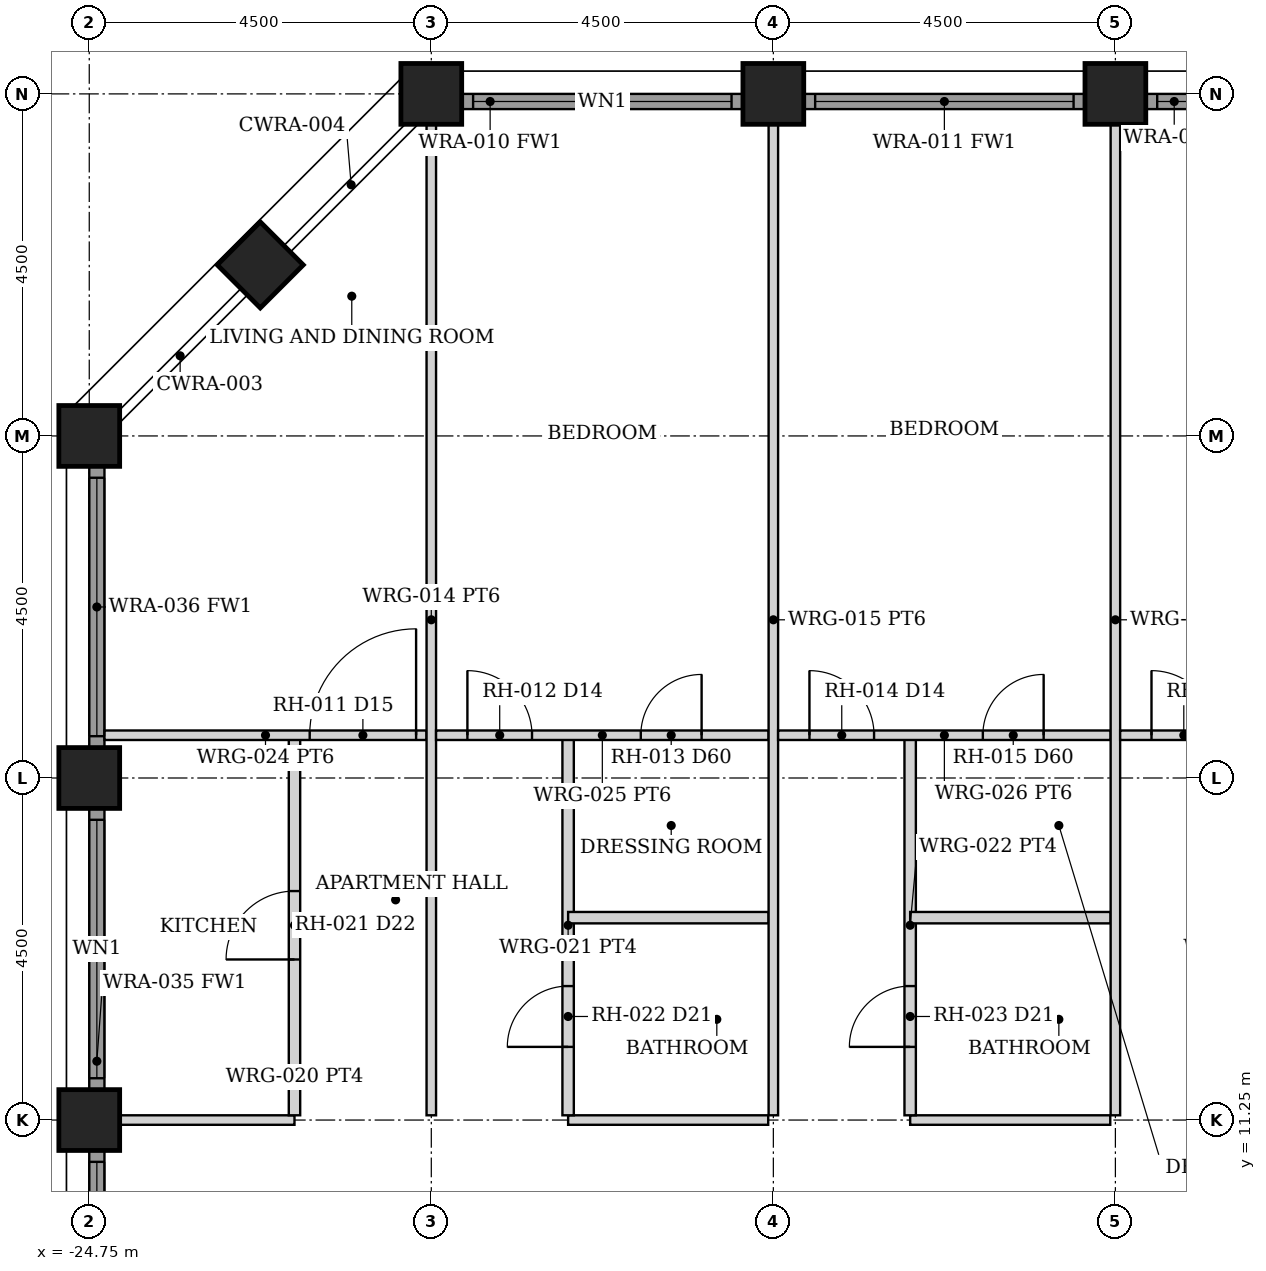
"""IFC4 building model, lengths in metres.
Left out: names, types, materials, properties, quantities, classifications, styles, units other than length and angle.
Written with IfcOpenShell. Run it as: python <this file> out.ifc"""

import sys

from ifc_helpers import new_model, si_unit, direction, frame, frame_2d, origin, origin_2d, place, context, subcontext, project, spatial, rectangle, hollow_rectangle, extrude, element, fill, save


model = new_model("IFC4")
c1 = context("Model", 3, precision=1e-05, world=origin(), true_north=direction((0.0, 1.0)))
c2 = subcontext(c1, "Body", "Model", "MODEL_VIEW")
j1 = project(units=[si_unit("LENGTHUNIT", "METRE"), si_unit("PLANEANGLEUNIT", "RADIAN")], contexts=[c1])
p1 = place(None, origin())
s1 = spatial("IfcSite", under=j1, at=p1, CompositionType="ELEMENT")
p2 = place(p1, origin())
s2 = spatial("IfcBuilding", under=s1, at=p2, CompositionType="ELEMENT")
p3 = place(p2, frame((0.0, 0.0, 100.0)))
s3 = spatial("IfcBuildingStorey", under=s2, at=p3, CompositionType="ELEMENT", Elevation=100.0)
for number, where, z_axis, x_axis in (
    (1, (-20.25, 24.75, 0.0), (0.0, 0.0, 1.0), (0.0, 1.0, 0.0)),
    (2, (-15.75, 24.75, 0.0), (0.0, 0.0, 1.0), (0.0, 1.0, 0.0)),
    (3, (-11.25, 24.75, 0.0), (0.0, 0.0, 1.0), (0.0, 1.0, 0.0)),
    (4, (-24.75, 11.25, 0.0), (0.0, 0.0, 1.0), (1.0, 0.0, 0.0)),
    (5, (-24.75, 15.75, 0.0), (0.0, 0.0, 1.0), (1.0, 0.0, 0.0)),
    (6, (-24.75, 20.25, 0.0), (0.0, 0.0, 1.0), (1.0, 0.0, 0.0)),
    (7, (-22.5, 22.5, 0.0), (0.0, 0.0, 1.0), (0.707, -0.707, 0.0)),
):
    element("IfcColumn", number, at=place(p3, frame(where, z_axis=z_axis, x_axis=x_axis)), inside=s3, PredefinedType="COLUMN", context=c2, shape_type="SweptSolid", body=[
        extrude(hollow_rectangle(XDim=0.8, YDim=0.8, WallThickness=0.06, at=origin_2d()), origin(), (0.0, 0.0, 1.0), 3.5),
    ])
p4 = place(p3, frame((-19.845, 24.65, 0.0), z_axis=(0.0, 0.0, 1.0), x_axis=(1.0, 0.0, 0.0)))
e8 = element("IfcWall", 8, at=p4, inside=s3, PredefinedType="SOLIDWALL", context=c2, shape_type="SweptSolid", body=[
    extrude(rectangle(XDim=3.69, YDim=0.2, at=frame_2d((1.845, 0.0))), origin(), (0.0, 0.0, 1.0), 2.379),
])
p5 = place(p4, frame((0.145, 0.0, 0.3)))
e9 = element("IfcOpeningElement", 9, at=p5, cuts=e8, PredefinedType="OPENING", context=c2, shape_type="SweptSolid", body=[
    extrude(rectangle(XDim=3.4, YDim=1.929, at=frame_2d((1.7, 0.964))), frame((0.0, 0.11, 0.0), z_axis=(0.0, -1.0, 0.0), x_axis=(1.0, 0.0, 0.0)), (0.0, 0.0, 1.0), 0.22),
])
p6 = place(p3, frame((-15.345, 24.65, 0.0), z_axis=(0.0, 0.0, 1.0), x_axis=(1.0, 0.0, 0.0)))
e10 = element("IfcWall", 10, at=p6, inside=s3, PredefinedType="SOLIDWALL", context=c2, shape_type="SweptSolid", body=[
    extrude(rectangle(XDim=3.69, YDim=0.2, at=frame_2d((1.845, 0.0))), origin(), (0.0, 0.0, 1.0), 2.379),
])
p7 = place(p6, frame((0.145, 0.0, 0.3)))
e11 = element("IfcOpeningElement", 11, at=p7, cuts=e10, PredefinedType="OPENING", context=c2, shape_type="SweptSolid", body=[
    extrude(rectangle(XDim=3.4, YDim=1.929, at=frame_2d((1.7, 0.964))), frame((0.0, 0.11, 0.0), z_axis=(0.0, -1.0, 0.0), x_axis=(1.0, 0.0, 0.0)), (0.0, 0.0, 1.0), 0.22),
])
p8 = place(p3, frame((-10.845, 24.65, 0.0), z_axis=(0.0, 0.0, 1.0), x_axis=(1.0, 0.0, 0.0)))
e12 = element("IfcWall", 12, at=p8, inside=s3, PredefinedType="SOLIDWALL", context=c2, shape_type="SweptSolid", body=[
    extrude(rectangle(XDim=3.69, YDim=0.2, at=frame_2d((1.845, 0.0))), origin(), (0.0, 0.0, 1.0), 2.379),
])
p9 = place(p8, frame((0.145, 0.0, 0.3)))
e13 = element("IfcOpeningElement", 13, at=p9, cuts=e12, PredefinedType="OPENING", context=c2, shape_type="SweptSolid", body=[
    extrude(rectangle(XDim=3.4, YDim=1.929, at=frame_2d((1.7, 0.964))), frame((0.0, 0.11, 0.0), z_axis=(0.0, -1.0, 0.0), x_axis=(1.0, 0.0, 0.0)), (0.0, 0.0, 1.0), 0.22),
])
p10 = place(p3, frame((-24.65, 7.155, 0.0), z_axis=(0.0, 0.0, 1.0), x_axis=(0.0, 1.0, 0.0)))
e14 = element("IfcWall", 14, at=p10, inside=s3, PredefinedType="SOLIDWALL", context=c2, shape_type="SweptSolid", body=[
    extrude(rectangle(XDim=3.69, YDim=0.2, at=frame_2d((1.845, 0.0))), origin(), (0.0, 0.0, 1.0), 2.379),
])
p11 = place(p10, frame((0.145, 0.0, 0.3)))
e15 = element("IfcOpeningElement", 15, at=p11, cuts=e14, PredefinedType="OPENING", context=c2, shape_type="SweptSolid", body=[
    extrude(rectangle(XDim=3.4, YDim=1.929, at=frame_2d((1.7, 0.964))), frame((0.0, 0.11, 0.0), z_axis=(0.0, -1.0, 0.0), x_axis=(1.0, 0.0, 0.0)), (0.0, 0.0, 1.0), 0.22),
])
p12 = place(p3, frame((-24.65, 11.655, 0.0), z_axis=(0.0, 0.0, 1.0), x_axis=(0.0, 1.0, 0.0)))
e16 = element("IfcWall", 16, at=p12, inside=s3, PredefinedType="SOLIDWALL", context=c2, shape_type="SweptSolid", body=[
    extrude(rectangle(XDim=3.69, YDim=0.2, at=frame_2d((1.845, 0.0))), origin(), (0.0, 0.0, 1.0), 2.379),
])
p13 = place(p12, frame((0.145, 0.0, 0.3)))
e17 = element("IfcOpeningElement", 17, at=p13, cuts=e16, PredefinedType="OPENING", context=c2, shape_type="SweptSolid", body=[
    extrude(rectangle(XDim=3.4, YDim=1.929, at=frame_2d((1.7, 0.964))), frame((0.0, 0.11, 0.0), z_axis=(0.0, -1.0, 0.0), x_axis=(1.0, 0.0, 0.0)), (0.0, 0.0, 1.0), 0.22),
])
p14 = place(p3, frame((-24.65, 16.155, 0.0), z_axis=(0.0, 0.0, 1.0), x_axis=(0.0, 1.0, 0.0)))
e18 = element("IfcWall", 18, at=p14, inside=s3, PredefinedType="SOLIDWALL", context=c2, shape_type="SweptSolid", body=[
    extrude(rectangle(XDim=3.69, YDim=0.2, at=frame_2d((1.845, 0.0))), origin(), (0.0, 0.0, 1.0), 2.379),
])
p15 = place(p14, frame((0.145, 0.0, 0.3)))
e19 = element("IfcOpeningElement", 19, at=p15, cuts=e18, PredefinedType="OPENING", context=c2, shape_type="SweptSolid", body=[
    extrude(rectangle(XDim=3.4, YDim=1.929, at=frame_2d((1.7, 0.964))), frame((0.0, 0.11, 0.0), z_axis=(0.0, -1.0, 0.0), x_axis=(1.0, 0.0, 0.0)), (0.0, 0.0, 1.0), 0.22),
])
p16 = place(p3, frame((-24.35, 11.25, 0.0), z_axis=(0.0, 0.0, 1.0), x_axis=(1.0, 0.0, 0.0)))
e20 = element("IfcWall", 20, at=p16, inside=s3, PredefinedType="PARTITIONING", context=c2, shape_type="SweptSolid", body=[
    extrude(rectangle(XDim=2.3, YDim=0.125, at=frame_2d((1.15, 0.0))), origin(), (0.0, 0.0, 1.0), 2.373),
])
p17 = place(p3, frame((-22.05, 11.312, 0.0), z_axis=(0.0, 0.0, 1.0), x_axis=(0.0, 1.0, 0.0)))
e21 = element("IfcWall", 21, at=p17, inside=s3, PredefinedType="PARTITIONING", context=c2, shape_type="SweptSolid", body=[
    extrude(rectangle(XDim=5.0, YDim=0.15, at=frame_2d((2.5, 0.0))), origin(), (0.0, 0.0, 1.0), 2.373),
])
p18 = place(p17, frame((2.05, 0.0, 0.0)))
e22 = element("IfcOpeningElement", 22, at=p18, cuts=e21, PredefinedType="OPENING", context=c2, shape_type="SweptSolid", body=[
    extrude(rectangle(XDim=0.9, YDim=2.1, at=frame_2d((0.45, 1.05))), frame((0.0, 0.085, 0.0), z_axis=(0.0, -1.0, 0.0), x_axis=(1.0, 0.0, 0.0)), (0.0, 0.0, 1.0), 0.17),
])
p19 = place(p3, frame((-24.55, 16.312, 0.0), z_axis=(0.0, 0.0, 1.0), x_axis=(1.0, 0.0, 0.0)))
e23 = element("IfcWall", 23, at=p19, inside=s3, PredefinedType="PARTITIONING", context=c2, shape_type="SweptSolid", body=[
    extrude(rectangle(XDim=4.238, YDim=0.125, at=frame_2d((2.119, 0.0))), origin(), (0.0, 0.0, 1.0), 2.373),
])
p20 = place(p19, frame((2.7, 0.0, 0.0)))
e24 = element("IfcOpeningElement", 24, at=p20, cuts=e23, PredefinedType="OPENING", context=c2, shape_type="SweptSolid", body=[
    extrude(rectangle(XDim=1.4, YDim=2.1, at=frame_2d((0.7, 1.05))), frame((0.0, 0.073, 0.0), z_axis=(0.0, -1.0, 0.0), x_axis=(1.0, 0.0, 0.0)), (0.0, 0.0, 1.0), 0.145),
])
p21 = place(p3, frame((-20.25, 11.312, 0.0), z_axis=(0.0, 0.0, 1.0), x_axis=(0.0, 1.0, 0.0)))
e25 = element("IfcWall", 25, at=p21, inside=s3, PredefinedType="PARTITIONING", context=c2, shape_type="SweptSolid", body=[
    extrude(rectangle(XDim=13.038, YDim=0.125, at=frame_2d((6.519, 0.0))), origin(), (0.0, 0.0, 1.0), 2.373),
])
p22 = place(p3, frame((-18.45, 11.25, 0.0), z_axis=(0.0, 0.0, 1.0), x_axis=(1.0, 0.0, 0.0)))
e26 = element("IfcWall", 26, at=p22, inside=s3, PredefinedType="PARTITIONING", context=c2, shape_type="SweptSolid", body=[
    extrude(rectangle(XDim=2.633, YDim=0.125, at=frame_2d((1.316, 0.0))), origin(), (0.0, 0.0, 1.0), 2.373),
])
p23 = place(p3, frame((-18.45, 11.312, 0.0), z_axis=(0.0, 0.0, 1.0), x_axis=(0.0, 1.0, 0.0)))
e27 = element("IfcWall", 27, at=p23, inside=s3, PredefinedType="PARTITIONING", context=c2, shape_type="SweptSolid", body=[
    extrude(rectangle(XDim=5.0, YDim=0.15, at=frame_2d((2.5, 0.0))), origin(), (0.0, 0.0, 1.0), 2.373),
])
p24 = place(p23, frame((0.9, 0.0, 0.0)))
e28 = element("IfcOpeningElement", 28, at=p24, cuts=e27, PredefinedType="OPENING", context=c2, shape_type="SweptSolid", body=[
    extrude(rectangle(XDim=0.8, YDim=2.1, at=frame_2d((0.4, 1.05))), frame((0.0, 0.085, 0.0), z_axis=(0.0, -1.0, 0.0), x_axis=(1.0, 0.0, 0.0)), (0.0, 0.0, 1.0), 0.17),
])
p25 = place(p3, frame((-20.188, 16.312, 0.0), z_axis=(0.0, 0.0, 1.0), x_axis=(1.0, 0.0, 0.0)))
e29 = element("IfcWall", 29, at=p25, inside=s3, PredefinedType="PARTITIONING", context=c2, shape_type="SweptSolid", body=[
    extrude(rectangle(XDim=4.375, YDim=0.125, at=frame_2d((2.188, 0.0))), origin(), (0.0, 0.0, 1.0), 2.373),
])
p26 = place(p25, frame((0.413, 0.0, 0.0)))
e30 = element("IfcOpeningElement", 30, at=p26, cuts=e29, PredefinedType="OPENING", context=c2, shape_type="SweptSolid", body=[
    extrude(rectangle(XDim=0.85, YDim=2.1, at=frame_2d((0.425, 1.05))), frame((0.0, 0.073, 0.0), z_axis=(0.0, -1.0, 0.0), x_axis=(1.0, 0.0, 0.0)), (0.0, 0.0, 1.0), 0.145),
])
p27 = place(p25, frame((2.694, 0.0, 0.0)))
e31 = element("IfcOpeningElement", 31, at=p27, cuts=e29, PredefinedType="OPENING", context=c2, shape_type="SweptSolid", body=[
    extrude(rectangle(XDim=0.8, YDim=2.1, at=frame_2d((0.4, 1.05))), frame((0.0, 0.073, 0.0), z_axis=(0.0, -1.0, 0.0), x_axis=(1.0, 0.0, 0.0)), (0.0, 0.0, 1.0), 0.145),
])
p28 = place(p3, frame((-18.45, 13.913, 0.0), z_axis=(0.0, 0.0, 1.0), x_axis=(1.0, 0.0, 0.0)))
e32 = element("IfcWall", 32, at=p28, inside=s3, PredefinedType="PARTITIONING", context=c2, shape_type="SweptSolid", body=[
    extrude(rectangle(XDim=2.637, YDim=0.15, at=frame_2d((1.319, 0.0))), origin(), (0.0, 0.0, 1.0), 2.373),
])
p29 = place(p3, frame((-15.75, 11.312, 0.0), z_axis=(0.0, 0.0, 1.0), x_axis=(0.0, 1.0, 0.0)))
e33 = element("IfcWall", 33, at=p29, inside=s3, PredefinedType="PARTITIONING", context=c2, shape_type="SweptSolid", body=[
    extrude(rectangle(XDim=13.038, YDim=0.125, at=frame_2d((6.519, 0.0))), origin(), (0.0, 0.0, 1.0), 2.373),
])
p30 = place(p3, frame((-13.95, 11.25, 0.0), z_axis=(0.0, 0.0, 1.0), x_axis=(1.0, 0.0, 0.0)))
e34 = element("IfcWall", 34, at=p30, inside=s3, PredefinedType="PARTITIONING", context=c2, shape_type="SweptSolid", body=[
    extrude(rectangle(XDim=2.633, YDim=0.125, at=frame_2d((1.316, 0.0))), origin(), (0.0, 0.0, 1.0), 2.373),
])
p31 = place(p3, frame((-13.95, 11.312, 0.0), z_axis=(0.0, 0.0, 1.0), x_axis=(0.0, 1.0, 0.0)))
e35 = element("IfcWall", 35, at=p31, inside=s3, PredefinedType="PARTITIONING", context=c2, shape_type="SweptSolid", body=[
    extrude(rectangle(XDim=5.0, YDim=0.15, at=frame_2d((2.5, 0.0))), origin(), (0.0, 0.0, 1.0), 2.373),
])
p32 = place(p31, frame((0.9, 0.0, 0.0)))
e36 = element("IfcOpeningElement", 36, at=p32, cuts=e35, PredefinedType="OPENING", context=c2, shape_type="SweptSolid", body=[
    extrude(rectangle(XDim=0.8, YDim=2.1, at=frame_2d((0.4, 1.05))), frame((0.0, 0.085, 0.0), z_axis=(0.0, -1.0, 0.0), x_axis=(1.0, 0.0, 0.0)), (0.0, 0.0, 1.0), 0.17),
])
p33 = place(p3, frame((-15.688, 16.312, 0.0), z_axis=(0.0, 0.0, 1.0), x_axis=(1.0, 0.0, 0.0)))
e37 = element("IfcWall", 37, at=p33, inside=s3, PredefinedType="PARTITIONING", context=c2, shape_type="SweptSolid", body=[
    extrude(rectangle(XDim=4.375, YDim=0.125, at=frame_2d((2.188, 0.0))), origin(), (0.0, 0.0, 1.0), 2.373),
])
p34 = place(p33, frame((0.413, 0.0, 0.0)))
e38 = element("IfcOpeningElement", 38, at=p34, cuts=e37, PredefinedType="OPENING", context=c2, shape_type="SweptSolid", body=[
    extrude(rectangle(XDim=0.85, YDim=2.1, at=frame_2d((0.425, 1.05))), frame((0.0, 0.073, 0.0), z_axis=(0.0, -1.0, 0.0), x_axis=(1.0, 0.0, 0.0)), (0.0, 0.0, 1.0), 0.145),
])
p35 = place(p33, frame((2.694, 0.0, 0.0)))
e39 = element("IfcOpeningElement", 39, at=p35, cuts=e37, PredefinedType="OPENING", context=c2, shape_type="SweptSolid", body=[
    extrude(rectangle(XDim=0.8, YDim=2.1, at=frame_2d((0.4, 1.05))), frame((0.0, 0.073, 0.0), z_axis=(0.0, -1.0, 0.0), x_axis=(1.0, 0.0, 0.0)), (0.0, 0.0, 1.0), 0.145),
])
p36 = place(p3, frame((-13.95, 13.913, 0.0), z_axis=(0.0, 0.0, 1.0), x_axis=(1.0, 0.0, 0.0)))
e40 = element("IfcWall", 40, at=p36, inside=s3, PredefinedType="PARTITIONING", context=c2, shape_type="SweptSolid", body=[
    extrude(rectangle(XDim=2.637, YDim=0.15, at=frame_2d((1.319, 0.0))), origin(), (0.0, 0.0, 1.0), 2.373),
])
p37 = place(p3, frame((-11.25, 11.312, 0.0), z_axis=(0.0, 0.0, 1.0), x_axis=(0.0, 1.0, 0.0)))
e41 = element("IfcWall", 41, at=p37, inside=s3, PredefinedType="PARTITIONING", context=c2, shape_type="SweptSolid", body=[
    extrude(rectangle(XDim=13.038, YDim=0.125, at=frame_2d((6.519, 0.0))), origin(), (0.0, 0.0, 1.0), 2.373),
])
p38 = place(p3, frame((-11.188, 16.312, 0.0), z_axis=(0.0, 0.0, 1.0), x_axis=(1.0, 0.0, 0.0)))
e42 = element("IfcWall", 42, at=p38, inside=s3, PredefinedType="PARTITIONING", context=c2, shape_type="SweptSolid", body=[
    extrude(rectangle(XDim=4.375, YDim=0.125, at=frame_2d((2.188, 0.0))), origin(), (0.0, 0.0, 1.0), 2.373),
])
p39 = place(p38, frame((0.413, 0.0, 0.0)))
e43 = element("IfcOpeningElement", 43, at=p39, cuts=e42, PredefinedType="OPENING", context=c2, shape_type="SweptSolid", body=[
    extrude(rectangle(XDim=0.85, YDim=2.1, at=frame_2d((0.425, 1.05))), frame((0.0, 0.073, 0.0), z_axis=(0.0, -1.0, 0.0), x_axis=(1.0, 0.0, 0.0)), (0.0, 0.0, 1.0), 0.145),
])
p40 = place(p38, frame((2.694, 0.0, 0.0)))
e44 = element("IfcOpeningElement", 44, at=p40, cuts=e42, PredefinedType="OPENING", context=c2, shape_type="SweptSolid", body=[
    extrude(rectangle(XDim=0.8, YDim=2.1, at=frame_2d((0.4, 1.05))), frame((0.0, 0.073, 0.0), z_axis=(0.0, -1.0, 0.0), x_axis=(1.0, 0.0, 0.0)), (0.0, 0.0, 1.0), 0.145),
])
p41 = place(p5, origin())
e45 = element("IfcWindow", 45, at=p41, inside=s3, PartitioningType="SINGLE_PANEL", PredefinedType="WINDOW", context=c2, shape_type="SweptSolid", body=[
    extrude(rectangle(XDim=3.4, YDim=1.929, at=frame_2d((1.7, 0.964))), frame((0.0, 0.03, 0.0), z_axis=(0.0, -1.0, 0.0), x_axis=(1.0, 0.0, 0.0)), (0.0, 0.0, 1.0), 0.06),
])
fill(e9, e45)
p42 = place(p7, origin())
e46 = element("IfcWindow", 46, at=p42, inside=s3, PartitioningType="SINGLE_PANEL", PredefinedType="WINDOW", context=c2, shape_type="SweptSolid", body=[
    extrude(rectangle(XDim=3.4, YDim=1.929, at=frame_2d((1.7, 0.964))), frame((0.0, 0.03, 0.0), z_axis=(0.0, -1.0, 0.0), x_axis=(1.0, 0.0, 0.0)), (0.0, 0.0, 1.0), 0.06),
])
fill(e11, e46)
p43 = place(p9, origin())
e47 = element("IfcWindow", 47, at=p43, inside=s3, PartitioningType="SINGLE_PANEL", PredefinedType="WINDOW", context=c2, shape_type="SweptSolid", body=[
    extrude(rectangle(XDim=3.4, YDim=1.929, at=frame_2d((1.7, 0.964))), frame((0.0, 0.03, 0.0), z_axis=(0.0, -1.0, 0.0), x_axis=(1.0, 0.0, 0.0)), (0.0, 0.0, 1.0), 0.06),
])
fill(e13, e47)
p44 = place(p11, origin())
e48 = element("IfcWindow", 48, at=p44, inside=s3, PartitioningType="SINGLE_PANEL", PredefinedType="WINDOW", context=c2, shape_type="SweptSolid", body=[
    extrude(rectangle(XDim=3.4, YDim=1.929, at=frame_2d((1.7, 0.964))), frame((0.0, 0.03, 0.0), z_axis=(0.0, -1.0, 0.0), x_axis=(1.0, 0.0, 0.0)), (0.0, 0.0, 1.0), 0.06),
])
fill(e15, e48)
p45 = place(p13, origin())
e49 = element("IfcWindow", 49, at=p45, inside=s3, PartitioningType="SINGLE_PANEL", PredefinedType="WINDOW", context=c2, shape_type="SweptSolid", body=[
    extrude(rectangle(XDim=3.4, YDim=1.929, at=frame_2d((1.7, 0.964))), frame((0.0, 0.03, 0.0), z_axis=(0.0, -1.0, 0.0), x_axis=(1.0, 0.0, 0.0)), (0.0, 0.0, 1.0), 0.06),
])
fill(e17, e49)
p46 = place(p15, origin())
e50 = element("IfcWindow", 50, at=p46, inside=s3, PartitioningType="SINGLE_PANEL", PredefinedType="WINDOW", context=c2, shape_type="SweptSolid", body=[
    extrude(rectangle(XDim=3.4, YDim=1.929, at=frame_2d((1.7, 0.964))), frame((0.0, 0.03, 0.0), z_axis=(0.0, -1.0, 0.0), x_axis=(1.0, 0.0, 0.0)), (0.0, 0.0, 1.0), 0.06),
])
fill(e19, e50)
p47 = place(p18, origin())
e51 = element("IfcDoor", 51, at=p47, inside=s3, OperationType="SINGLE_SWING_LEFT", PredefinedType="DOOR", context=c2, shape_type="SweptSolid", body=[
    extrude(rectangle(XDim=0.9, YDim=2.1, at=frame_2d((0.45, 1.05))), frame((0.0, 0.025, 0.0), z_axis=(0.0, -1.0, 0.0), x_axis=(1.0, 0.0, 0.0)), (0.0, 0.0, 1.0), 0.05),
])
fill(e22, e51)
p48 = place(p20, origin())
e52 = element("IfcDoor", 52, at=p48, inside=s3, OperationType="SINGLE_SWING_RIGHT", PredefinedType="DOOR", context=c2, shape_type="SweptSolid", body=[
    extrude(rectangle(XDim=1.4, YDim=2.1, at=frame_2d((0.7, 1.05))), frame((0.0, 0.025, 0.0), z_axis=(0.0, -1.0, 0.0), x_axis=(1.0, 0.0, 0.0)), (0.0, 0.0, 1.0), 0.05),
])
fill(e24, e52)
p49 = place(p26, origin())
e53 = element("IfcDoor", 53, at=p49, inside=s3, OperationType="SINGLE_SWING_LEFT", PredefinedType="DOOR", context=c2, shape_type="SweptSolid", body=[
    extrude(rectangle(XDim=0.85, YDim=2.1, at=frame_2d((0.425, 1.05))), frame((0.0, 0.025, 0.0), z_axis=(0.0, -1.0, 0.0), x_axis=(1.0, 0.0, 0.0)), (0.0, 0.0, 1.0), 0.05),
])
fill(e30, e53)
p50 = place(p24, origin())
e54 = element("IfcDoor", 54, at=p50, inside=s3, OperationType="SINGLE_SWING_LEFT", PredefinedType="DOOR", context=c2, shape_type="SweptSolid", body=[
    extrude(rectangle(XDim=0.8, YDim=2.1, at=frame_2d((0.4, 1.05))), frame((0.0, 0.025, 0.0), z_axis=(0.0, -1.0, 0.0), x_axis=(1.0, 0.0, 0.0)), (0.0, 0.0, 1.0), 0.05),
])
fill(e28, e54)
p51 = place(p27, origin())
e55 = element("IfcDoor", 55, at=p51, inside=s3, OperationType="SINGLE_SWING_RIGHT", PredefinedType="DOOR", context=c2, shape_type="SweptSolid", body=[
    extrude(rectangle(XDim=0.8, YDim=2.1, at=frame_2d((0.4, 1.05))), frame((0.0, 0.025, 0.0), z_axis=(0.0, -1.0, 0.0), x_axis=(1.0, 0.0, 0.0)), (0.0, 0.0, 1.0), 0.05),
])
fill(e31, e55)
p52 = place(p34, origin())
e56 = element("IfcDoor", 56, at=p52, inside=s3, OperationType="SINGLE_SWING_LEFT", PredefinedType="DOOR", context=c2, shape_type="SweptSolid", body=[
    extrude(rectangle(XDim=0.85, YDim=2.1, at=frame_2d((0.425, 1.05))), frame((0.0, 0.025, 0.0), z_axis=(0.0, -1.0, 0.0), x_axis=(1.0, 0.0, 0.0)), (0.0, 0.0, 1.0), 0.05),
])
fill(e38, e56)
p53 = place(p32, origin())
e57 = element("IfcDoor", 57, at=p53, inside=s3, OperationType="SINGLE_SWING_LEFT", PredefinedType="DOOR", context=c2, shape_type="SweptSolid", body=[
    extrude(rectangle(XDim=0.8, YDim=2.1, at=frame_2d((0.4, 1.05))), frame((0.0, 0.025, 0.0), z_axis=(0.0, -1.0, 0.0), x_axis=(1.0, 0.0, 0.0)), (0.0, 0.0, 1.0), 0.05),
])
fill(e36, e57)
p54 = place(p35, origin())
e58 = element("IfcDoor", 58, at=p54, inside=s3, OperationType="SINGLE_SWING_RIGHT", PredefinedType="DOOR", context=c2, shape_type="SweptSolid", body=[
    extrude(rectangle(XDim=0.8, YDim=2.1, at=frame_2d((0.4, 1.05))), frame((0.0, 0.025, 0.0), z_axis=(0.0, -1.0, 0.0), x_axis=(1.0, 0.0, 0.0)), (0.0, 0.0, 1.0), 0.05),
])
fill(e39, e58)
p55 = place(p39, origin())
e59 = element("IfcDoor", 59, at=p55, inside=s3, OperationType="SINGLE_SWING_LEFT", PredefinedType="DOOR", context=c2, shape_type="SweptSolid", body=[
    extrude(rectangle(XDim=0.85, YDim=2.1, at=frame_2d((0.425, 1.05))), frame((0.0, 0.025, 0.0), z_axis=(0.0, -1.0, 0.0), x_axis=(1.0, 0.0, 0.0)), (0.0, 0.0, 1.0), 0.05),
])
fill(e43, e59)
save(model, sys.argv[1])
